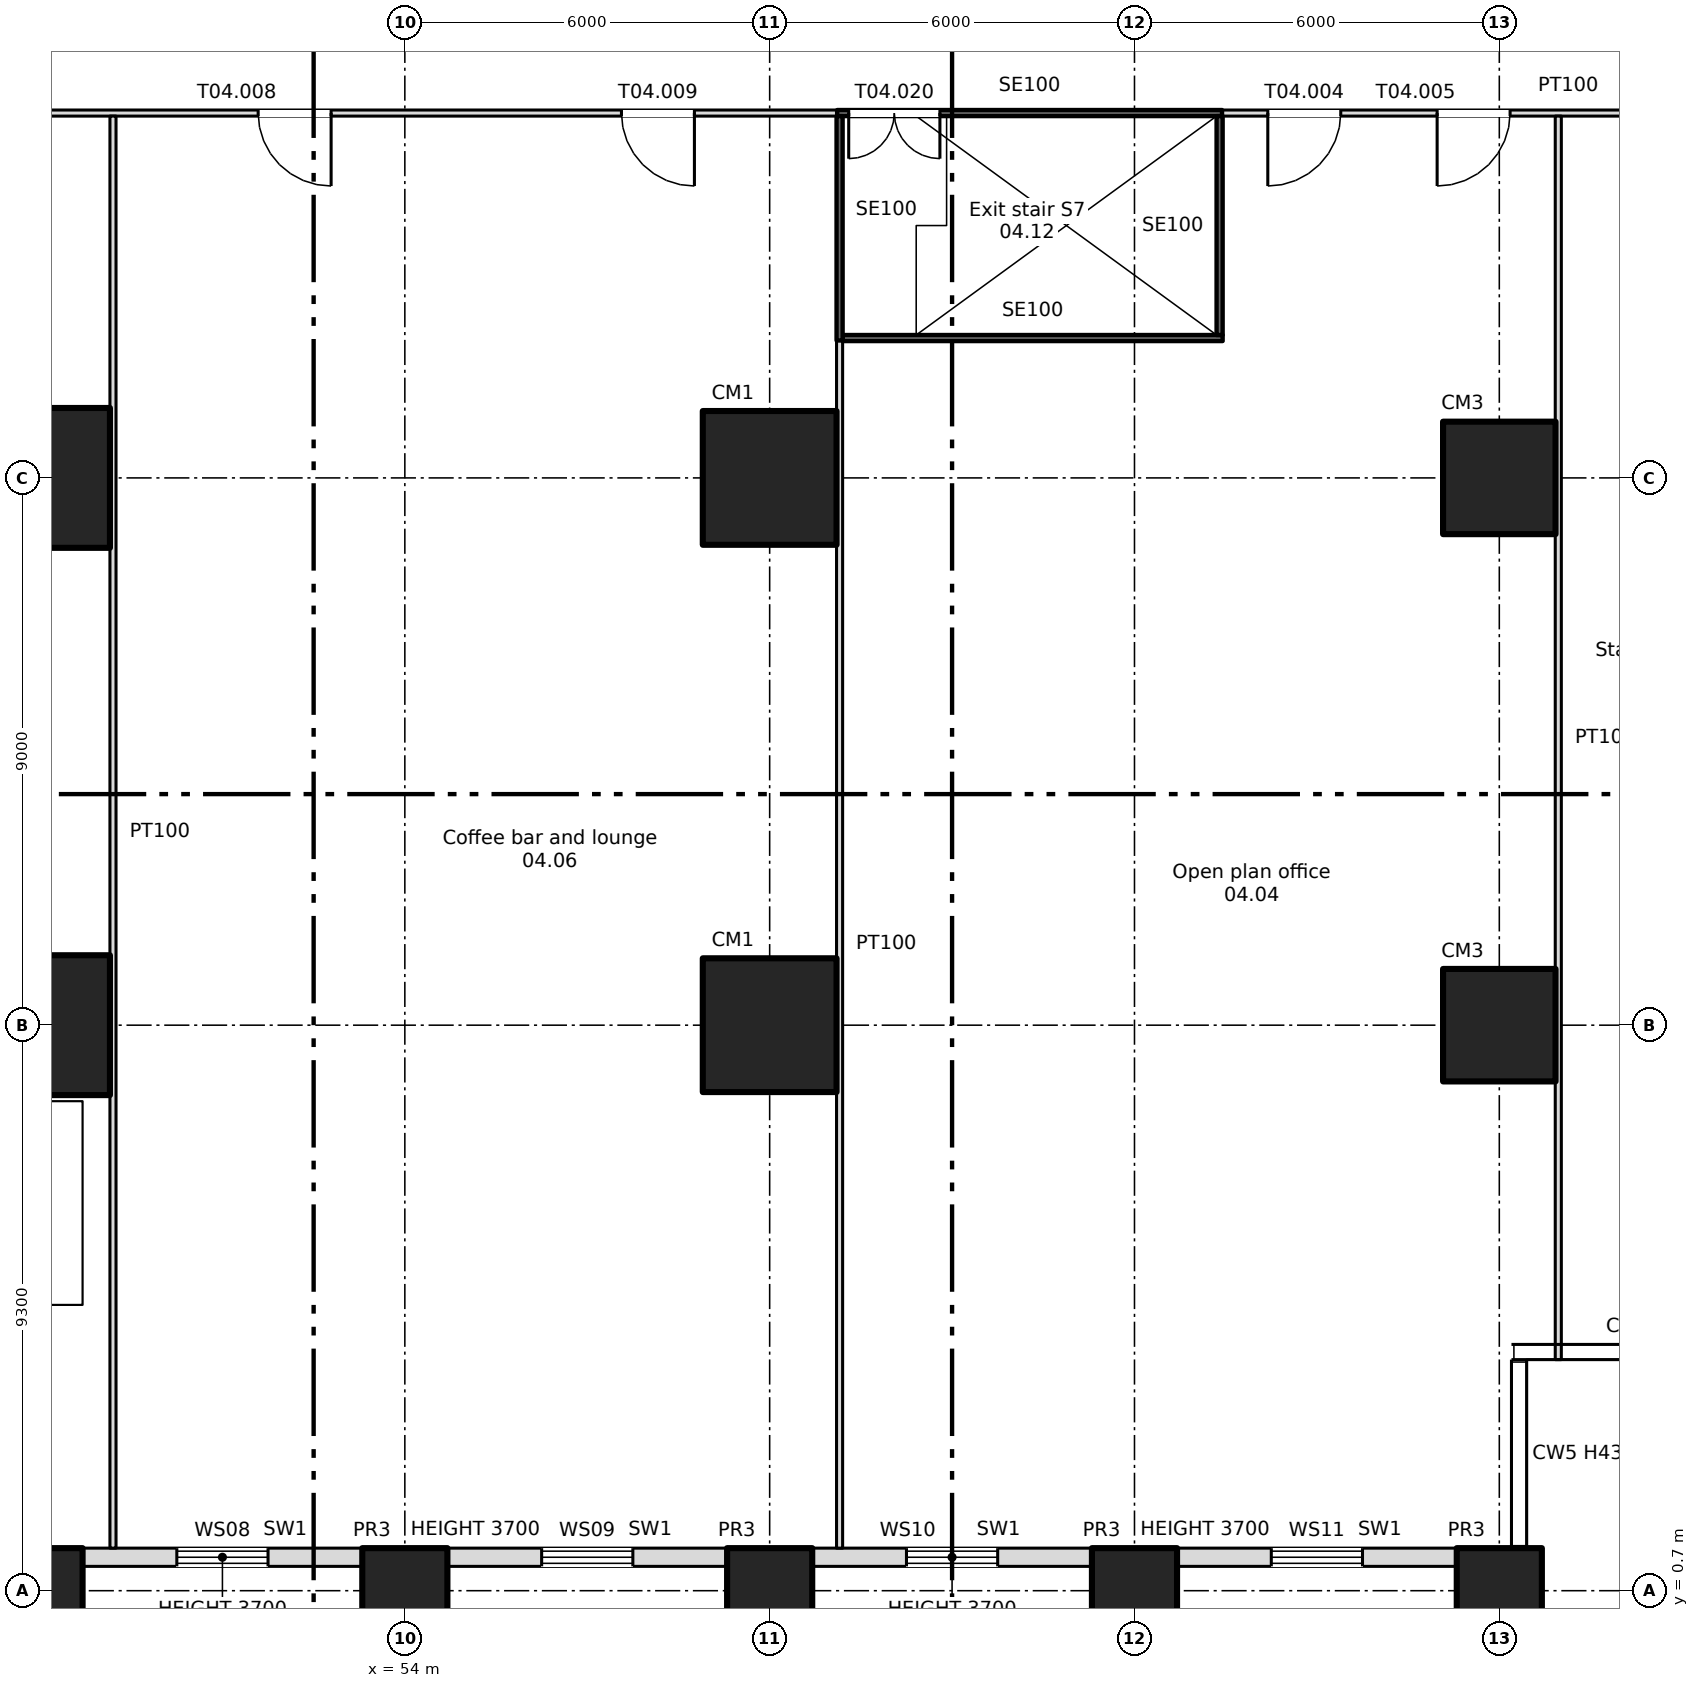
"""IFC4 building model, lengths in metres.
Left out: names, types, materials, properties, quantities, classifications, styles, units other than length and angle.
Written with IfcOpenShell. Run it as: python <this file> out.ifc"""

import sys

from ifc_helpers import new_model, si_unit, direction, frame, frame_2d, origin, origin_2d, place, context, subcontext, project, spatial, rectangle, extrude, element, fill, save


model = new_model("IFC4")
c1 = context("Model", 3, precision=1e-05, world=origin(), true_north=direction((0.0, 1.0)))
c2 = subcontext(c1, "Body", "Model", "MODEL_VIEW")
j1 = project(units=[si_unit("LENGTHUNIT", "METRE"), si_unit("PLANEANGLEUNIT", "RADIAN")], contexts=[c1])
p1 = place(None, origin())
s1 = spatial("IfcSite", under=j1, at=p1, CompositionType="ELEMENT")
p2 = place(p1, origin())
s2 = spatial("IfcBuilding", under=s1, at=p2, CompositionType="ELEMENT")
p3 = place(p2, frame((0.0, 0.0, 6.5)))
s3 = spatial("IfcBuildingStorey", under=s2, at=p3, CompositionType="ELEMENT", Elevation=6.5)
for number, where, z_axis, x_axis in (
    (1, (48.0, 0.7, -1.1), (0.0, 0.0, 1.0), (1.0, 0.0, 0.0)),
    (2, (54.0, 0.7, -1.1), (0.0, 0.0, 1.0), (1.0, 0.0, 0.0)),
    (3, (60.0, 0.7, -1.1), (0.0, 0.0, 1.0), (1.0, 0.0, 0.0)),
    (4, (66.0, 0.7, -1.1), (0.0, 0.0, 1.0), (1.0, 0.0, 0.0)),
    (5, (72.0, 0.7, -1.1), (0.0, 0.0, 1.0), (1.0, 0.0, 0.0)),
):
    element("IfcColumn", number, at=place(p3, frame(where, z_axis=z_axis, x_axis=x_axis)), inside=s3, PredefinedType="COLUMN", context=c2, shape_type="SweptSolid", body=[
        extrude(rectangle(XDim=1.4, YDim=1.4, at=origin_2d()), origin(), (0.0, 0.0, 1.0), 5.4),
    ])
for number, where, z_axis, x_axis in (
    (6, (48.0, 10.0, 0.0), (0.0, 0.0, 1.0), (1.0, 0.0, 0.0)),
    (7, (48.0, 19.0, 0.0), (0.0, 0.0, 1.0), (1.0, 0.0, 0.0)),
):
    element("IfcColumn", number, at=place(p3, frame(where, z_axis=z_axis, x_axis=x_axis)), inside=s3, PredefinedType="COLUMN", context=c2, shape_type="SweptSolid", body=[
        extrude(rectangle(XDim=2.3, YDim=2.3, at=origin_2d()), origin(), (0.0, 0.0, 1.0), 4.3),
    ])
for number, where, z_axis, x_axis in (
    (8, (60.0, 10.0, 0.0), (0.0, 0.0, 1.0), (1.0, 0.0, 0.0)),
    (9, (60.0, 19.0, 0.0), (0.0, 0.0, 1.0), (1.0, 0.0, 0.0)),
):
    element("IfcColumn", number, at=place(p3, frame(where, z_axis=z_axis, x_axis=x_axis)), inside=s3, PredefinedType="COLUMN", context=c2, shape_type="SweptSolid", body=[
        extrude(rectangle(XDim=2.2, YDim=2.2, at=origin_2d()), origin(), (0.0, 0.0, 1.0), 4.3),
    ])
for number, where, z_axis, x_axis in (
    (10, (72.0, 10.0, 0.0), (0.0, 0.0, 1.0), (1.0, 0.0, 0.0)),
    (11, (72.0, 19.0, 0.0), (0.0, 0.0, 1.0), (1.0, 0.0, 0.0)),
):
    element("IfcColumn", number, at=place(p3, frame(where, z_axis=z_axis, x_axis=x_axis)), inside=s3, PredefinedType="COLUMN", context=c2, shape_type="SweptSolid", body=[
        extrude(rectangle(XDim=1.85, YDim=1.85, at=origin_2d()), origin(), (0.0, 0.0, 1.0), 4.3),
    ])
p4 = place(p3, frame((48.7, 1.25, 0.0), z_axis=(0.0, 0.0, 1.0), x_axis=(1.0, 0.0, 0.0)))
e12 = element("IfcWall", 12, at=p4, inside=s3, PredefinedType="SOLIDWALL", context=c2, shape_type="SweptSolid", body=[
    extrude(rectangle(XDim=4.6, YDim=0.3, at=frame_2d((2.3, 0.0))), origin(), (0.0, 0.0, 1.0), 3.7),
])
p5 = place(p4, frame((1.55, 0.0, 0.9)))
e13 = element("IfcOpeningElement", 13, at=p5, cuts=e12, PredefinedType="OPENING", context=c2, shape_type="SweptSolid", body=[
    extrude(rectangle(XDim=1.5, YDim=2.4, at=frame_2d((0.75, 1.2))), frame((0.0, 0.16, 0.0), z_axis=(0.0, -1.0, 0.0), x_axis=(1.0, 0.0, 0.0)), (0.0, 0.0, 1.0), 0.32),
])
p6 = place(p3, frame((54.7, 1.25, 0.0), z_axis=(0.0, 0.0, 1.0), x_axis=(1.0, 0.0, 0.0)))
e14 = element("IfcWall", 14, at=p6, inside=s3, PredefinedType="SOLIDWALL", context=c2, shape_type="SweptSolid", body=[
    extrude(rectangle(XDim=4.6, YDim=0.3, at=frame_2d((2.3, 0.0))), origin(), (0.0, 0.0, 1.0), 3.7),
])
p7 = place(p6, frame((1.55, 0.0, 0.9)))
e15 = element("IfcOpeningElement", 15, at=p7, cuts=e14, PredefinedType="OPENING", context=c2, shape_type="SweptSolid", body=[
    extrude(rectangle(XDim=1.5, YDim=2.4, at=frame_2d((0.75, 1.2))), frame((0.0, 0.16, 0.0), z_axis=(0.0, -1.0, 0.0), x_axis=(1.0, 0.0, 0.0)), (0.0, 0.0, 1.0), 0.32),
])
p8 = place(p3, frame((60.7, 1.25, 0.0), z_axis=(0.0, 0.0, 1.0), x_axis=(1.0, 0.0, 0.0)))
e16 = element("IfcWall", 16, at=p8, inside=s3, PredefinedType="SOLIDWALL", context=c2, shape_type="SweptSolid", body=[
    extrude(rectangle(XDim=4.6, YDim=0.3, at=frame_2d((2.3, 0.0))), origin(), (0.0, 0.0, 1.0), 3.7),
])
p9 = place(p8, frame((1.55, 0.0, 0.9)))
e17 = element("IfcOpeningElement", 17, at=p9, cuts=e16, PredefinedType="OPENING", context=c2, shape_type="SweptSolid", body=[
    extrude(rectangle(XDim=1.5, YDim=2.4, at=frame_2d((0.75, 1.2))), frame((0.0, 0.16, 0.0), z_axis=(0.0, -1.0, 0.0), x_axis=(1.0, 0.0, 0.0)), (0.0, 0.0, 1.0), 0.32),
])
p10 = place(p3, frame((66.7, 1.25, 0.0), z_axis=(0.0, 0.0, 1.0), x_axis=(1.0, 0.0, 0.0)))
e18 = element("IfcWall", 18, at=p10, inside=s3, PredefinedType="SOLIDWALL", context=c2, shape_type="SweptSolid", body=[
    extrude(rectangle(XDim=4.6, YDim=0.3, at=frame_2d((2.3, 0.0))), origin(), (0.0, 0.0, 1.0), 3.7),
])
p11 = place(p10, frame((1.55, 0.0, 0.9)))
e19 = element("IfcOpeningElement", 19, at=p11, cuts=e18, PredefinedType="OPENING", context=c2, shape_type="SweptSolid", body=[
    extrude(rectangle(XDim=1.5, YDim=2.4, at=frame_2d((0.75, 1.2))), frame((0.0, 0.16, 0.0), z_axis=(0.0, -1.0, 0.0), x_axis=(1.0, 0.0, 0.0)), (0.0, 0.0, 1.0), 0.32),
])
p12 = place(p3, frame((61.2, 21.3, 0.0), z_axis=(0.0, 0.0, 1.0), x_axis=(1.0, 0.0, 0.0)))
e20 = element("IfcWall", 20, at=p12, inside=s3, PredefinedType="SOLIDWALL", context=c2, shape_type="SweptSolid", body=[
    extrude(rectangle(XDim=6.25, YDim=0.1, at=frame_2d((3.125, 0.0))), origin(), (0.0, 0.0, 1.0), 4.3),
])
p13 = place(p3, frame((10.09, 25.0, 0.0), z_axis=(0.0, 0.0, 1.0), x_axis=(1.0, 0.0, 0.0)))
e21 = element("IfcWall", 21, at=p13, inside=s3, PredefinedType="PARTITIONING", context=c2, shape_type="SweptSolid", body=[
    extrude(rectangle(XDim=51.02, YDim=0.1, at=frame_2d((25.51, 0.0))), origin(), (0.0, 0.0, 1.0), 4.3),
])
p14 = place(p13, frame((20.51, 0.0, 0.0)))
e22 = element("IfcOpeningElement", 22, at=p14, cuts=e21, PredefinedType="OPENING", context=c2, shape_type="SweptSolid", body=[
    extrude(rectangle(XDim=1.2, YDim=2.1, at=frame_2d((0.6, 1.05))), frame((0.0, 0.06, 0.0), z_axis=(0.0, -1.0, 0.0), x_axis=(1.0, 0.0, 0.0)), (0.0, 0.0, 1.0), 0.12),
])
p15 = place(p13, frame((32.51, 0.0, 0.0)))
e23 = element("IfcOpeningElement", 23, at=p15, cuts=e21, PredefinedType="OPENING", context=c2, shape_type="SweptSolid", body=[
    extrude(rectangle(XDim=1.2, YDim=2.1, at=frame_2d((0.6, 1.05))), frame((0.0, 0.06, 0.0), z_axis=(0.0, -1.0, 0.0), x_axis=(1.0, 0.0, 0.0)), (0.0, 0.0, 1.0), 0.12),
])
p16 = place(p13, frame((41.498, 0.0, 0.0)))
e24 = element("IfcOpeningElement", 24, at=p16, cuts=e21, PredefinedType="OPENING", context=c2, shape_type="SweptSolid", body=[
    extrude(rectangle(XDim=1.2, YDim=2.1, at=frame_2d((0.6, 1.05))), frame((0.0, 0.06, 0.0), z_axis=(0.0, -1.0, 0.0), x_axis=(1.0, 0.0, 0.0)), (0.0, 0.0, 1.0), 0.12),
])
p17 = place(p13, frame((47.472, 0.0, 0.0)))
e25 = element("IfcOpeningElement", 25, at=p17, cuts=e21, PredefinedType="OPENING", context=c2, shape_type="SweptSolid", body=[
    extrude(rectangle(XDim=1.2, YDim=2.1, at=frame_2d((0.6, 1.05))), frame((0.0, 0.06, 0.0), z_axis=(0.0, -1.0, 0.0), x_axis=(1.0, 0.0, 0.0)), (0.0, 0.0, 1.0), 0.12),
])
p18 = place(p13, frame((1.073, 0.0, 0.0)))
e26 = element("IfcOpeningElement", 26, at=p18, cuts=e21, PredefinedType="OPENING", context=c2, shape_type="SweptSolid", body=[
    extrude(rectangle(XDim=1.0, YDim=2.1, at=frame_2d((0.5, 1.05))), frame((0.0, 0.06, 0.0), z_axis=(0.0, -1.0, 0.0), x_axis=(1.0, 0.0, 0.0)), (0.0, 0.0, 1.0), 0.12),
])
p19 = place(p13, frame((4.298, 0.0, 0.0)))
e27 = element("IfcOpeningElement", 27, at=p19, cuts=e21, PredefinedType="OPENING", context=c2, shape_type="SweptSolid", body=[
    extrude(rectangle(XDim=1.0, YDim=2.1, at=frame_2d((0.5, 1.05))), frame((0.0, 0.06, 0.0), z_axis=(0.0, -1.0, 0.0), x_axis=(1.0, 0.0, 0.0)), (0.0, 0.0, 1.0), 0.12),
])
p20 = place(p13, frame((8.085, 0.0, 0.0)))
e28 = element("IfcOpeningElement", 28, at=p20, cuts=e21, PredefinedType="OPENING", context=c2, shape_type="SweptSolid", body=[
    extrude(rectangle(XDim=1.0, YDim=2.1, at=frame_2d((0.5, 1.05))), frame((0.0, 0.06, 0.0), z_axis=(0.0, -1.0, 0.0), x_axis=(1.0, 0.0, 0.0)), (0.0, 0.0, 1.0), 0.12),
])
p21 = place(p13, frame((12.435, 0.0, 0.0)))
e29 = element("IfcOpeningElement", 29, at=p21, cuts=e21, PredefinedType="OPENING", context=c2, shape_type="SweptSolid", body=[
    extrude(rectangle(XDim=1.0, YDim=2.1, at=frame_2d((0.5, 1.05))), frame((0.0, 0.06, 0.0), z_axis=(0.0, -1.0, 0.0), x_axis=(1.0, 0.0, 0.0)), (0.0, 0.0, 1.0), 0.12),
])
p22 = place(p3, frame((61.11, 25.0, 0.0), z_axis=(0.0, 0.0, 1.0), x_axis=(1.0, 0.0, 0.0)))
e30 = element("IfcWall", 30, at=p22, inside=s3, PredefinedType="SOLIDWALL", context=c2, shape_type="SweptSolid", body=[
    extrude(rectangle(XDim=6.33, YDim=0.1, at=frame_2d((3.165, 0.0))), origin(), (0.0, 0.0, 1.0), 4.3),
])
p23 = place(p22, frame((0.19, 0.0, 0.0)))
e31 = element("IfcOpeningElement", 31, at=p23, cuts=e30, PredefinedType="OPENING", context=c2, shape_type="SweptSolid", body=[
    extrude(rectangle(XDim=1.5, YDim=2.1, at=frame_2d((0.75, 1.05))), frame((0.0, 0.06, 0.0), z_axis=(0.0, -1.0, 0.0), x_axis=(1.0, 0.0, 0.0)), (0.0, 0.0, 1.0), 0.12),
])
p24 = place(p3, frame((67.44, 25.0, 0.0), z_axis=(0.0, 0.0, 1.0), x_axis=(1.0, 0.0, 0.0)))
e32 = element("IfcWall", 32, at=p24, inside=s3, PredefinedType="PARTITIONING", context=c2, shape_type="SweptSolid", body=[
    extrude(rectangle(XDim=9.76, YDim=0.1, at=frame_2d((4.88, 0.0))), origin(), (0.0, 0.0, 1.0), 4.3),
])
p25 = place(p24, frame((0.752, 0.0, 0.0)))
e33 = element("IfcOpeningElement", 33, at=p25, cuts=e32, PredefinedType="OPENING", context=c2, shape_type="SweptSolid", body=[
    extrude(rectangle(XDim=1.2, YDim=2.1, at=frame_2d((0.6, 1.05))), frame((0.0, 0.06, 0.0), z_axis=(0.0, -1.0, 0.0), x_axis=(1.0, 0.0, 0.0)), (0.0, 0.0, 1.0), 0.12),
])
p26 = place(p24, frame((3.538, 0.0, 0.0)))
e34 = element("IfcOpeningElement", 34, at=p26, cuts=e32, PredefinedType="OPENING", context=c2, shape_type="SweptSolid", body=[
    extrude(rectangle(XDim=1.2, YDim=2.1, at=frame_2d((0.6, 1.05))), frame((0.0, 0.06, 0.0), z_axis=(0.0, -1.0, 0.0), x_axis=(1.0, 0.0, 0.0)), (0.0, 0.0, 1.0), 0.12),
])
p27 = place(p24, frame((6.745, 0.0, 0.0)))
e35 = element("IfcOpeningElement", 35, at=p27, cuts=e32, PredefinedType="OPENING", context=c2, shape_type="SweptSolid", body=[
    extrude(rectangle(XDim=1.8, YDim=2.1, at=frame_2d((0.9, 1.05))), frame((0.0, 0.06, 0.0), z_axis=(0.0, -1.0, 0.0), x_axis=(1.0, 0.0, 0.0)), (0.0, 0.0, 1.0), 0.12),
])
p28 = place(p3, frame((49.2, 1.4, 0.0), z_axis=(0.0, 0.0, 1.0), x_axis=(0.0, 1.0, 0.0)))
e36 = element("IfcWall", 36, at=p28, inside=s3, PredefinedType="PARTITIONING", context=c2, shape_type="SweptSolid", body=[
    extrude(rectangle(XDim=23.55, YDim=0.1, at=frame_2d((11.775, 0.0))), origin(), (0.0, 0.0, 1.0), 4.3),
])
p29 = place(p3, frame((61.15, 1.4, 0.0), z_axis=(0.0, 0.0, 1.0), x_axis=(0.0, 1.0, 0.0)))
e37 = element("IfcWall", 37, at=p29, inside=s3, PredefinedType="PARTITIONING", context=c2, shape_type="SweptSolid", body=[
    extrude(rectangle(XDim=19.86, YDim=0.1, at=frame_2d((9.93, 0.0))), origin(), (0.0, 0.0, 1.0), 4.3),
])
p30 = place(p3, frame((61.15, 21.26, 0.0), z_axis=(0.0, 0.0, 1.0), x_axis=(0.0, 1.0, 0.0)))
e38 = element("IfcWall", 38, at=p30, inside=s3, PredefinedType="SOLIDWALL", context=c2, shape_type="SweptSolid", body=[
    extrude(rectangle(XDim=3.69, YDim=0.1, at=frame_2d((1.845, 0.0))), origin(), (0.0, 0.0, 1.0), 4.3),
])
p31 = place(p3, frame((67.4, 21.35, 0.0), z_axis=(0.0, 0.0, 1.0), x_axis=(0.0, 1.0, 0.0)))
e39 = element("IfcWall", 39, at=p31, inside=s3, PredefinedType="SOLIDWALL", context=c2, shape_type="SweptSolid", body=[
    extrude(rectangle(XDim=3.6, YDim=0.1, at=frame_2d((1.8, 0.0))), origin(), (0.0, 0.0, 1.0), 4.3),
])
p32 = place(p3, frame((72.97, 4.5, 0.0), z_axis=(0.0, 0.0, 1.0), x_axis=(0.0, 1.0, 0.0)))
e40 = element("IfcWall", 40, at=p32, inside=s3, PredefinedType="PARTITIONING", context=c2, shape_type="SweptSolid", body=[
    extrude(rectangle(XDim=20.45, YDim=0.1, at=frame_2d((10.225, 0.0))), origin(), (0.0, 0.0, 1.0), 4.3),
])
p33 = place(p5, origin())
e41 = element("IfcWindow", 41, at=p33, inside=s3, PartitioningType="SINGLE_PANEL", PredefinedType="WINDOW", context=c2, shape_type="SweptSolid", body=[
    extrude(rectangle(XDim=1.5, YDim=2.4, at=frame_2d((0.75, 1.2))), frame((0.0, 0.03, 0.0), z_axis=(0.0, -1.0, 0.0), x_axis=(1.0, 0.0, 0.0)), (0.0, 0.0, 1.0), 0.06),
])
fill(e13, e41)
p34 = place(p7, origin())
e42 = element("IfcWindow", 42, at=p34, inside=s3, PartitioningType="SINGLE_PANEL", PredefinedType="WINDOW", context=c2, shape_type="SweptSolid", body=[
    extrude(rectangle(XDim=1.5, YDim=2.4, at=frame_2d((0.75, 1.2))), frame((0.0, 0.03, 0.0), z_axis=(0.0, -1.0, 0.0), x_axis=(1.0, 0.0, 0.0)), (0.0, 0.0, 1.0), 0.06),
])
fill(e15, e42)
p35 = place(p9, origin())
e43 = element("IfcWindow", 43, at=p35, inside=s3, PartitioningType="SINGLE_PANEL", PredefinedType="WINDOW", context=c2, shape_type="SweptSolid", body=[
    extrude(rectangle(XDim=1.5, YDim=2.4, at=frame_2d((0.75, 1.2))), frame((0.0, 0.03, 0.0), z_axis=(0.0, -1.0, 0.0), x_axis=(1.0, 0.0, 0.0)), (0.0, 0.0, 1.0), 0.06),
])
fill(e17, e43)
p36 = place(p11, origin())
e44 = element("IfcWindow", 44, at=p36, inside=s3, PartitioningType="SINGLE_PANEL", PredefinedType="WINDOW", context=c2, shape_type="SweptSolid", body=[
    extrude(rectangle(XDim=1.5, YDim=2.4, at=frame_2d((0.75, 1.2))), frame((0.0, 0.03, 0.0), z_axis=(0.0, -1.0, 0.0), x_axis=(1.0, 0.0, 0.0)), (0.0, 0.0, 1.0), 0.06),
])
fill(e19, e44)
p37 = place(p25, origin())
e45 = element("IfcDoor", 45, at=p37, inside=s3, OperationType="SINGLE_SWING_LEFT", PredefinedType="DOOR", context=c2, shape_type="SweptSolid", body=[
    extrude(rectangle(XDim=1.2, YDim=2.1, at=frame_2d((0.6, 1.05))), frame((0.0, 0.025, 0.0), z_axis=(0.0, -1.0, 0.0), x_axis=(1.0, 0.0, 0.0)), (0.0, 0.0, 1.0), 0.05),
])
fill(e33, e45)
p38 = place(p26, origin())
e46 = element("IfcDoor", 46, at=p38, inside=s3, OperationType="SINGLE_SWING_LEFT", PredefinedType="DOOR", context=c2, shape_type="SweptSolid", body=[
    extrude(rectangle(XDim=1.2, YDim=2.1, at=frame_2d((0.6, 1.05))), frame((0.0, 0.025, 0.0), z_axis=(0.0, -1.0, 0.0), x_axis=(1.0, 0.0, 0.0)), (0.0, 0.0, 1.0), 0.05),
])
fill(e34, e46)
p39 = place(p16, origin())
e47 = element("IfcDoor", 47, at=p39, inside=s3, OperationType="SINGLE_SWING_RIGHT", PredefinedType="DOOR", context=c2, shape_type="SweptSolid", body=[
    extrude(rectangle(XDim=1.2, YDim=2.1, at=frame_2d((0.6, 1.05))), frame((0.0, 0.025, 0.0), z_axis=(0.0, -1.0, 0.0), x_axis=(1.0, 0.0, 0.0)), (0.0, 0.0, 1.0), 0.05),
])
fill(e24, e47)
p40 = place(p17, origin())
e48 = element("IfcDoor", 48, at=p40, inside=s3, OperationType="SINGLE_SWING_RIGHT", PredefinedType="DOOR", context=c2, shape_type="SweptSolid", body=[
    extrude(rectangle(XDim=1.2, YDim=2.1, at=frame_2d((0.6, 1.05))), frame((0.0, 0.025, 0.0), z_axis=(0.0, -1.0, 0.0), x_axis=(1.0, 0.0, 0.0)), (0.0, 0.0, 1.0), 0.05),
])
fill(e25, e48)
p41 = place(p23, origin())
e49 = element("IfcDoor", 49, at=p41, inside=s3, OperationType="DOUBLE_DOOR_SINGLE_SWING", PredefinedType="DOOR", context=c2, shape_type="SweptSolid", body=[
    extrude(rectangle(XDim=1.5, YDim=2.1, at=frame_2d((0.75, 1.05))), frame((0.0, 0.025, 0.0), z_axis=(0.0, -1.0, 0.0), x_axis=(1.0, 0.0, 0.0)), (0.0, 0.0, 1.0), 0.05),
])
fill(e31, e49)
save(model, sys.argv[1])
